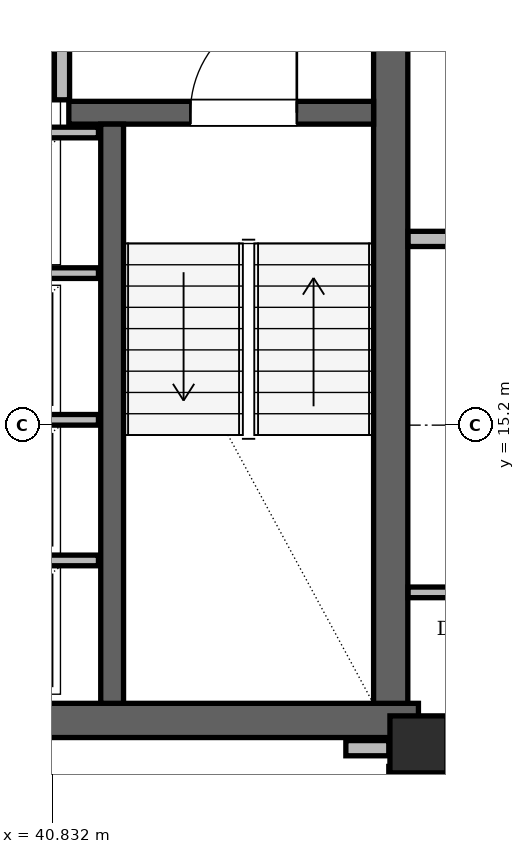
"""IFC4 building model, lengths in metres.
Left out: names, types, materials, properties, quantities, classifications, styles, units other than length and angle.
Written with IfcOpenShell. Run it as: python <this file> out.ifc"""

import sys

from ifc_helpers import new_model, si_unit, direction, frame, frame_2d, origin, origin_2d, place, context, subcontext, project, spatial, rectangle, hollow_rectangle, extrude, element, fill, save


model = new_model("IFC4")
c1 = context("Model", 3, precision=1e-05, world=origin(), true_north=direction((0.0, 1.0)))
c2 = subcontext(c1, "Body", "Model", "MODEL_VIEW")
j1 = project(units=[si_unit("LENGTHUNIT", "METRE"), si_unit("PLANEANGLEUNIT", "RADIAN")], contexts=[c1])
p1 = place(None, origin())
s1 = spatial("IfcSite", under=j1, at=p1, CompositionType="ELEMENT")
p2 = place(p1, origin())
s2 = spatial("IfcBuilding", under=s1, at=p2, CompositionType="ELEMENT")
p3 = place(p2, frame((0.0, 0.0, 160.2)))
s3 = spatial("IfcBuildingStorey", under=s2, at=p3, CompositionType="ELEMENT", Elevation=160.2)
p4 = place(p3, frame((45.65, 11.0, 0.0), z_axis=(0.0, 0.0, 1.0), x_axis=(1.0, 0.0, 0.0)))
e1 = element("IfcColumn", 1, at=p4, inside=s3, PredefinedType="COLUMN", context=c2, shape_type="SweptSolid", body=[
    extrude(hollow_rectangle(XDim=0.75, YDim=0.75, WallThickness=0.06, at=origin_2d()), origin(), (0.0, 0.0, 1.0), 3.6),
])
p5 = place(p3, frame((45.285, 11.0, 0.0), z_axis=(0.0, 0.0, 1.0), x_axis=(0.0, 1.0, 0.0)))
e2 = element("IfcWall", 2, at=p5, inside=s3, PredefinedType="SHEAR", context=c2, shape_type="SweptSolid", body=[
    extrude(rectangle(XDim=13.3, YDim=0.45, at=frame_2d((6.65, 0.0))), origin(), (0.0, 0.0, 1.0), 3.38),
])
p6 = place(p3, frame((38.55, 11.315, 0.0), z_axis=(0.0, 0.0, 1.0), x_axis=(1.0, 0.0, 0.0)))
e3 = element("IfcWall", 3, at=p6, inside=s3, PredefinedType="SHEAR", context=c2, shape_type="SweptSolid", body=[
    extrude(rectangle(XDim=7.1, YDim=0.45, at=frame_2d((3.55, 0.0))), origin(), (0.0, 0.0, 1.0), 3.38),
])
p7 = place(p3, frame((41.05, 19.31, 0.0), z_axis=(0.0, 0.0, 1.0), x_axis=(1.0, 0.0, 0.0)))
e4 = element("IfcWall", 4, at=p7, inside=s3, PredefinedType="SHEAR", context=c2, shape_type="SweptSolid", body=[
    extrude(rectangle(XDim=4.01, YDim=0.3, at=frame_2d((2.005, 0.0))), origin(), (0.0, 0.0, 1.0), 3.38),
])
p8 = place(p7, frame((1.6, 0.0, 0.0)))
e5 = element("IfcOpeningElement", 5, at=p8, cuts=e4, PredefinedType="OPENING", context=c2, shape_type="SweptSolid", body=[
    extrude(rectangle(XDim=1.4, YDim=2.2, at=frame_2d((0.7, 1.1))), frame((0.0, 0.15, 0.0), z_axis=(0.0, -1.0, 0.0), x_axis=(1.0, 0.0, 0.0)), (0.0, 0.0, 1.0), 0.3),
])
p9 = place(p3, frame((41.62, 11.54, 0.0), z_axis=(0.0, 0.0, 1.0), x_axis=(0.0, 1.0, 0.0)))
e6 = element("IfcWall", 6, at=p9, inside=s3, PredefinedType="SHEAR", context=c2, shape_type="SweptSolid", body=[
    extrude(rectangle(XDim=7.62, YDim=0.3, at=frame_2d((3.81, 0.0))), origin(), (0.0, 0.0, 1.0), 3.38),
])
p10 = place(p3, frame((59.853, 12.41, 0.0), z_axis=(0.0, 0.0, 1.0), x_axis=(-0.499995364632, 0.866028079999, 0.0)))
e7 = element("IfcWall", 7, at=p10, inside=s3, PredefinedType="SOLIDWALL", context=c2, shape_type="SweptSolid", body=[
    extrude(rectangle(XDim=35.673, YDim=0.34, at=frame_2d((17.836, 0.0))), origin(), (0.0, 0.0, 1.0), 2.6),
])
p11 = place(p10, frame((6.579, 0.0, 0.0)))
e8 = element("IfcOpeningElement", 8, at=p11, cuts=e7, PredefinedType="OPENING", context=c2, shape_type="SweptSolid", body=[
    extrude(rectangle(XDim=1.5, YDim=2.2, at=frame_2d((0.75, 1.1))), frame((0.0, 0.17, 0.0), z_axis=(0.0, -1.0, 0.0), x_axis=(1.0, 0.0, 0.0)), (0.0, 0.0, 1.0), 0.34),
])
p12 = place(p10, frame((26.238, 0.0, 0.0)))
e9 = element("IfcOpeningElement", 9, at=p12, cuts=e7, PredefinedType="OPENING", context=c2, shape_type="SweptSolid", body=[
    extrude(rectangle(XDim=1.3, YDim=2.2, at=frame_2d((0.65, 1.1))), frame((0.0, 0.17, 0.0), z_axis=(0.0, -1.0, 0.0), x_axis=(1.0, 0.0, 0.0)), (0.0, 0.0, 1.0), 0.34),
])
p13 = place(p10, frame((0.99, 0.0, 0.85)))
e10 = element("IfcOpeningElement", 10, at=p13, cuts=e7, PredefinedType="OPENING", context=c2, shape_type="SweptSolid", body=[
    extrude(rectangle(XDim=1.2, YDim=1.48, at=frame_2d((0.6, 0.74))), frame((0.0, 0.17, 0.0), z_axis=(0.0, -1.0, 0.0), x_axis=(1.0, 0.0, 0.0)), (0.0, 0.0, 1.0), 0.34),
])
p14 = place(p10, frame((2.449, 0.0, 0.85)))
e11 = element("IfcOpeningElement", 11, at=p14, cuts=e7, PredefinedType="OPENING", context=c2, shape_type="SweptSolid", body=[
    extrude(rectangle(XDim=1.2, YDim=1.48, at=frame_2d((0.6, 0.74))), frame((0.0, 0.17, 0.0), z_axis=(0.0, -1.0, 0.0), x_axis=(1.0, 0.0, 0.0)), (0.0, 0.0, 1.0), 0.34),
])
p15 = place(p10, frame((16.807, 0.0, 0.85)))
e12 = element("IfcOpeningElement", 12, at=p15, cuts=e7, PredefinedType="OPENING", context=c2, shape_type="SweptSolid", body=[
    extrude(rectangle(XDim=3.0, YDim=1.64, at=frame_2d((1.5, 0.82))), frame((0.0, 0.17, 0.0), z_axis=(0.0, -1.0, 0.0), x_axis=(1.0, 0.0, 0.0)), (0.0, 0.0, 1.0), 0.34),
])
p16 = place(p10, frame((22.859, 0.0, 0.85)))
e13 = element("IfcOpeningElement", 13, at=p16, cuts=e7, PredefinedType="OPENING", context=c2, shape_type="SweptSolid", body=[
    extrude(rectangle(XDim=1.2, YDim=1.48, at=frame_2d((0.6, 0.74))), frame((0.0, 0.17, 0.0), z_axis=(0.0, -1.0, 0.0), x_axis=(1.0, 0.0, 0.0)), (0.0, 0.0, 1.0), 0.34),
])
p17 = place(p10, frame((13.203, 0.0, 0.85)))
e14 = element("IfcOpeningElement", 14, at=p17, cuts=e7, PredefinedType="OPENING", context=c2, shape_type="SweptSolid", body=[
    extrude(rectangle(XDim=1.2, YDim=1.48, at=frame_2d((0.6, 0.74))), frame((0.0, 0.17, 0.0), z_axis=(0.0, -1.0, 0.0), x_axis=(1.0, 0.0, 0.0)), (0.0, 0.0, 1.0), 0.34),
])
p18 = place(p10, frame((31.37, 0.0, 0.85)))
e15 = element("IfcOpeningElement", 15, at=p18, cuts=e7, PredefinedType="OPENING", context=c2, shape_type="SweptSolid", body=[
    extrude(rectangle(XDim=3.0, YDim=1.64, at=frame_2d((1.5, 0.82))), frame((0.0, 0.17, 0.0), z_axis=(0.0, -1.0, 0.0), x_axis=(1.0, 0.0, 0.0)), (0.0, 0.0, 1.0), 0.34),
])
p19 = place(p3, frame((40.96, 19.48, 0.0), z_axis=(0.0, 0.0, 1.0), x_axis=(0.0, 1.0, 0.0)))
e16 = element("IfcWall", 16, at=p19, inside=s3, PredefinedType="PARTITIONING", context=c2, shape_type="SweptSolid", body=[
    extrude(rectangle(XDim=4.5, YDim=0.2, at=frame_2d((2.25, 0.0))), origin(), (0.0, 0.0, 1.0), 2.42),
])
p20 = place(p19, frame((2.12, 0.0, 0.0)))
e17 = element("IfcOpeningElement", 17, at=p20, cuts=e16, PredefinedType="OPENING", context=c2, shape_type="SweptSolid", body=[
    extrude(rectangle(XDim=1.1, YDim=2.2, at=frame_2d((0.55, 1.1))), frame((0.0, 0.1, 0.0), z_axis=(0.0, -1.0, 0.0), x_axis=(1.0, 0.0, 0.0)), (0.0, 0.0, 1.0), 0.2),
])
for number, where, z_axis, x_axis in (
    (18, (38.78, 13.42, 0.0), (0.0, 0.0, 1.0), (1.0, 0.0, 0.0)),
    (19, (38.78, 15.27, 0.0), (0.0, 0.0, 1.0), (1.0, 0.0, 0.0)),
    (20, (38.78, 17.2, 0.0), (0.0, 0.0, 1.0), (1.0, 0.0, 0.0)),
    (21, (38.78, 19.05, 0.0), (0.0, 0.0, 1.0), (1.0, 0.0, 0.0)),
):
    element("IfcWall", number, at=place(p3, frame(where, z_axis=z_axis, x_axis=x_axis)), inside=s3, PredefinedType="PARTITIONING", context=c2, shape_type="SweptSolid", body=[
        extrude(rectangle(XDim=2.66, YDim=0.14, at=frame_2d((1.33, 0.0))), origin(), (0.0, 0.0, 1.0), 3.38),
    ])
p21 = place(p3, frame((45.26, 10.61, 0.0), z_axis=(0.0, 0.0, 1.0), x_axis=(1.0, 0.0, 0.0)))
e22 = element("IfcWall", 22, at=p21, inside=s3, PredefinedType="PARTITIONING", context=c2, shape_type="SweptSolid", body=[
    extrude(rectangle(XDim=0.78, YDim=0.2, at=frame_2d((0.39, 0.0))), origin(), (0.0, 0.0, 1.0), 2.42),
])
p22 = place(p3, frame((44.695, 10.95, 0.0), z_axis=(0.0, 0.0, 1.0), x_axis=(1.0, 0.0, 0.0)))
e23 = element("IfcWall", 23, at=p22, inside=s3, PredefinedType="PARTITIONING", context=c2, shape_type="SweptSolid", body=[
    extrude(rectangle(XDim=0.565, YDim=0.2, at=frame_2d((0.282, 0.0))), origin(), (0.0, 0.0, 1.0), 2.42),
])
p23 = place(p3, frame((45.514, 13.0, 0.0), z_axis=(0.0, 0.0, 1.0), x_axis=(1.0, 0.0, 0.0)))
e24 = element("IfcWall", 24, at=p23, inside=s3, PredefinedType="PARTITIONING", context=c2, shape_type="SweptSolid", body=[
    extrude(rectangle(XDim=13.798, YDim=0.14, at=frame_2d((6.899, 0.0))), origin(), (0.0, 0.0, 1.0), 2.42),
])
p24 = place(p23, frame((0.536, 0.0, 0.0)))
e25 = element("IfcOpeningElement", 25, at=p24, cuts=e24, PredefinedType="OPENING", context=c2, shape_type="SweptSolid", body=[
    extrude(rectangle(XDim=0.88, YDim=2.08, at=frame_2d((0.44, 1.04))), frame((0.0, 0.07, 0.0), z_axis=(0.0, -1.0, 0.0), x_axis=(1.0, 0.0, 0.0)), (0.0, 0.0, 1.0), 0.14),
])
p25 = place(p23, frame((2.486, 0.0, 0.0)))
e26 = element("IfcOpeningElement", 26, at=p25, cuts=e24, PredefinedType="OPENING", context=c2, shape_type="SweptSolid", body=[
    extrude(rectangle(XDim=0.95, YDim=2.1, at=frame_2d((0.475, 1.05))), frame((0.0, 0.07, 0.0), z_axis=(0.0, -1.0, 0.0), x_axis=(1.0, 0.0, 0.0)), (0.0, 0.0, 1.0), 0.14),
])
p26 = place(p23, frame((8.46, 0.0, 0.0)))
e27 = element("IfcOpeningElement", 27, at=p26, cuts=e24, PredefinedType="OPENING", context=c2, shape_type="SweptSolid", body=[
    extrude(rectangle(XDim=0.92, YDim=2.12, at=frame_2d((0.46, 1.06))), frame((0.0, 0.07, 0.0), z_axis=(0.0, -1.0, 0.0), x_axis=(1.0, 0.0, 0.0)), (0.0, 0.0, 1.0), 0.14),
])
p27 = place(p3, frame((45.514, 17.65, 0.0), z_axis=(0.0, 0.0, 1.0), x_axis=(1.0, 0.0, 0.0)))
e28 = element("IfcWall", 28, at=p27, inside=s3, PredefinedType="PARTITIONING", context=c2, shape_type="SweptSolid", body=[
    extrude(rectangle(XDim=11.113, YDim=0.2, at=frame_2d((5.557, 0.0))), origin(), (0.0, 0.0, 1.0), 2.42),
])
p28 = place(p8, origin())
e29 = element("IfcDoor", 29, at=p28, inside=s3, OperationType="SINGLE_SWING_RIGHT", PredefinedType="DOOR", context=c2, shape_type="SweptSolid", body=[
    extrude(rectangle(XDim=1.4, YDim=2.2, at=frame_2d((0.7, 1.1))), frame((0.0, 0.025, 0.0), z_axis=(0.0, -1.0, 0.0), x_axis=(1.0, 0.0, 0.0)), (0.0, 0.0, 1.0), 0.05),
])
fill(e5, e29)
save(model, sys.argv[1])
